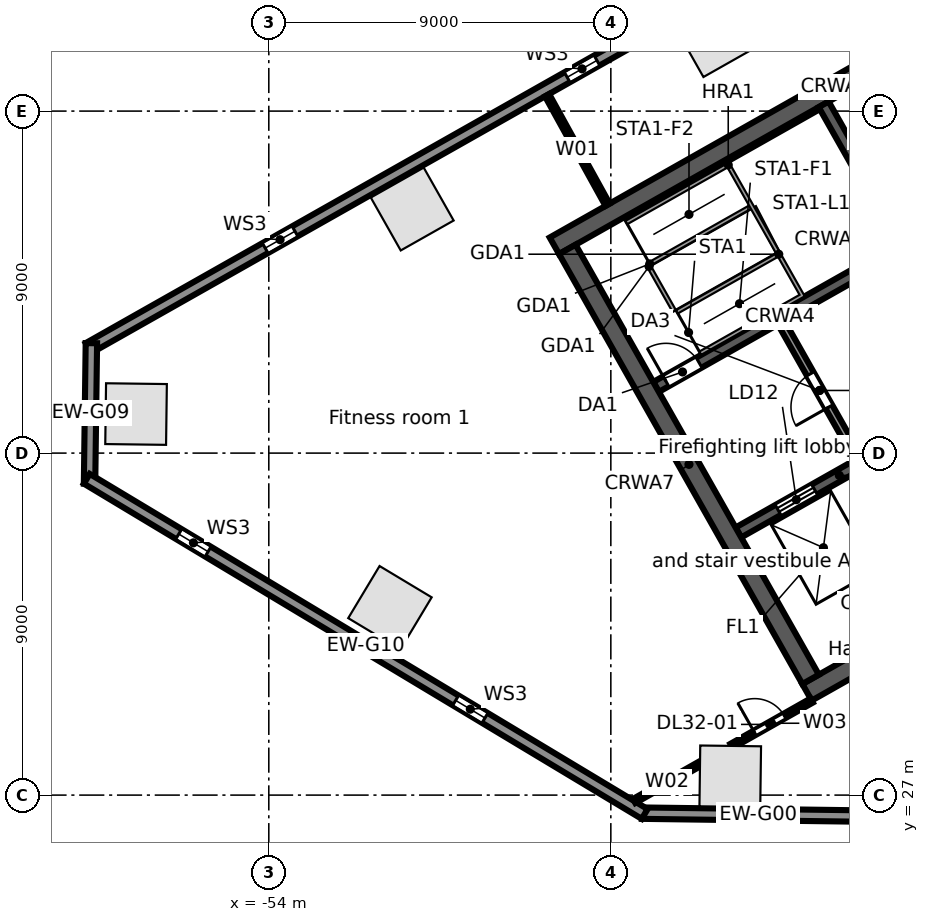
"""IFC4 building model, lengths in metres.
Left out: names, types, materials, properties, quantities, classifications, styles, units other than length and angle.
Written with IfcOpenShell. Run it as: python <this file> out.ifc"""

import sys

from ifc_helpers import new_model, si_unit, direction, frame, frame_2d, origin, origin_2d, place, context, subcontext, project, spatial, rectangle, extrude, element, fill, save


model = new_model("IFC4")
c1 = context("Model", 3, precision=1e-05, world=origin(), true_north=direction((0.0, 1.0)))
c2 = subcontext(c1, "Body", "Model", "MODEL_VIEW")
j1 = project(units=[si_unit("LENGTHUNIT", "METRE"), si_unit("PLANEANGLEUNIT", "RADIAN")], contexts=[c1])
p1 = place(None, origin())
s1 = spatial("IfcSite", under=j1, at=p1, CompositionType="ELEMENT")
p2 = place(p1, origin())
s2 = spatial("IfcBuilding", under=s1, at=p2, CompositionType="ELEMENT")
p3 = place(p2, frame((0.0, 0.0, 162.9)))
s3 = spatial("IfcBuildingStorey", under=s2, at=p3, CompositionType="ELEMENT", Elevation=162.9)
p4 = place(p3, frame((-42.28, 46.919, 0.0), z_axis=(0.0, 0.0, 1.0), x_axis=(-0.87035569594, -0.492423560103, 0.0)))
e1 = element("IfcColumn", 1, at=p4, inside=s3, PredefinedType="COLUMN", context=c2, shape_type="SweptSolid", body=[
    extrude(rectangle(XDim=1.5, YDim=1.5, at=origin_2d()), origin(), (0.0, 0.0, 1.0), 4.0),
])
for number, where, z_axis, x_axis in (
    (2, (-50.226, 42.423, 0.0), (0.0, 0.0, 1.0), (-0.87, -0.492, 0.0)),
    (3, (-57.493, 37.027, 0.0), (0.0, 0.0, 1.0), (-0.013, -1.0, 0.0)),
    (4, (-50.812, 31.931, 0.0), (0.0, 0.0, 1.0), (0.857, -0.515, 0.0)),
    (5, (-41.858, 27.495, 0.0), (0.0, 0.0, 1.0), (1.0, -0.013, 0.0)),
):
    element("IfcColumn", number, at=place(p3, frame(where, z_axis=z_axis, x_axis=x_axis)), inside=s3, PredefinedType="COLUMN", context=c2, shape_type="SweptSolid", body=[
        extrude(rectangle(XDim=1.6, YDim=1.6, at=origin_2d()), origin(), (0.0, 0.0, 1.0), 4.0),
    ])
p5 = place(p3, frame((-38.057, 26.445, 0.0), z_axis=(0.0, 0.0, 1.0), x_axis=(-0.999914086342, 0.013108010296, 0.0)))
e6 = element("IfcWall", 6, at=p5, inside=s3, PredefinedType="STANDARD", context=c2, shape_type="SweptSolid", body=[
    extrude(rectangle(XDim=6.128, YDim=0.3, at=frame_2d((3.064, 0.0))), origin(), (0.0, 0.0, 1.0), 3.68),
])
p6 = place(p3, frame((-58.745, 38.764, 0.0), z_axis=(0.0, 0.0, 1.0), x_axis=(0.870355811726, 0.492423355453, 0.0)))
e7 = element("IfcWall", 7, at=p6, inside=s3, PredefinedType="STANDARD", context=c2, shape_type="SweptSolid", body=[
    extrude(rectangle(XDim=64.025, YDim=0.3, at=frame_2d((32.013, 0.0))), origin(), (0.0, 0.0, 1.0), 3.68),
])
p7 = place(p6, frame((60.122, 0.0, 0.6)))
e8 = element("IfcOpeningElement", 8, at=p7, cuts=e7, PredefinedType="OPENING", context=c2, shape_type="SweptSolid", body=[
    extrude(rectangle(XDim=0.9, YDim=2.4, at=frame_2d((0.45, 1.2))), frame((0.0, 0.16, 0.0), z_axis=(0.0, -1.0, 0.0), x_axis=(1.0, 0.0, 0.0)), (0.0, 0.0, 1.0), 0.32),
])
p8 = place(p6, frame((50.992, 0.0, 0.6)))
e9 = element("IfcOpeningElement", 9, at=p8, cuts=e7, PredefinedType="OPENING", context=c2, shape_type="SweptSolid", body=[
    extrude(rectangle(XDim=0.9, YDim=2.4, at=frame_2d((0.45, 1.2))), frame((0.0, 0.16, 0.0), z_axis=(0.0, -1.0, 0.0), x_axis=(1.0, 0.0, 0.0)), (0.0, 0.0, 1.0), 0.32),
])
p9 = place(p6, frame((41.862, 0.0, 0.6)))
e10 = element("IfcOpeningElement", 10, at=p9, cuts=e7, PredefinedType="OPENING", context=c2, shape_type="SweptSolid", body=[
    extrude(rectangle(XDim=0.9, YDim=2.4, at=frame_2d((0.45, 1.2))), frame((0.0, 0.16, 0.0), z_axis=(0.0, -1.0, 0.0), x_axis=(1.0, 0.0, 0.0)), (0.0, 0.0, 1.0), 0.32),
])
p10 = place(p6, frame((32.732, 0.0, 0.6)))
e11 = element("IfcOpeningElement", 11, at=p10, cuts=e7, PredefinedType="OPENING", context=c2, shape_type="SweptSolid", body=[
    extrude(rectangle(XDim=0.9, YDim=2.4, at=frame_2d((0.45, 1.2))), frame((0.0, 0.16, 0.0), z_axis=(0.0, -1.0, 0.0), x_axis=(1.0, 0.0, 0.0)), (0.0, 0.0, 1.0), 0.32),
])
p11 = place(p6, frame((23.602, 0.0, 0.6)))
e12 = element("IfcOpeningElement", 12, at=p11, cuts=e7, PredefinedType="OPENING", context=c2, shape_type="SweptSolid", body=[
    extrude(rectangle(XDim=0.9, YDim=2.4, at=frame_2d((0.45, 1.2))), frame((0.0, 0.16, 0.0), z_axis=(0.0, -1.0, 0.0), x_axis=(1.0, 0.0, 0.0)), (0.0, 0.0, 1.0), 0.32),
])
p12 = place(p6, frame((14.472, 0.0, 0.6)))
e13 = element("IfcOpeningElement", 13, at=p12, cuts=e7, PredefinedType="OPENING", context=c2, shape_type="SweptSolid", body=[
    extrude(rectangle(XDim=0.9, YDim=2.4, at=frame_2d((0.45, 1.2))), frame((0.0, 0.16, 0.0), z_axis=(0.0, -1.0, 0.0), x_axis=(1.0, 0.0, 0.0)), (0.0, 0.0, 1.0), 0.32),
])
p13 = place(p6, frame((5.342, 0.0, 0.6)))
e14 = element("IfcOpeningElement", 14, at=p13, cuts=e7, PredefinedType="OPENING", context=c2, shape_type="SweptSolid", body=[
    extrude(rectangle(XDim=0.9, YDim=2.4, at=frame_2d((0.45, 1.2))), frame((0.0, 0.16, 0.0), z_axis=(0.0, -1.0, 0.0), x_axis=(1.0, 0.0, 0.0)), (0.0, 0.0, 1.0), 0.32),
])
p14 = place(p3, frame((-58.717, 35.194, 0.0), z_axis=(0.0, 0.0, 1.0), x_axis=(0.013069053407, 0.999914596275, 0.0)))
e15 = element("IfcWall", 15, at=p14, inside=s3, PredefinedType="STANDARD", context=c2, shape_type="SweptSolid", body=[
    extrude(rectangle(XDim=3.699, YDim=0.3, at=frame_2d((1.849, 0.0))), origin(), (0.0, 0.0, 1.0), 3.68),
])
p15 = place(p3, frame((-44.109, 26.504, 0.0), z_axis=(0.0, 0.0, 1.0), x_axis=(-0.857169502585, 0.515034410344, 0.0)))
e16 = element("IfcWall", 16, at=p15, inside=s3, PredefinedType="STANDARD", context=c2, shape_type="SweptSolid", body=[
    extrude(rectangle(XDim=17.127, YDim=0.3, at=frame_2d((8.563, 0.0))), origin(), (0.0, 0.0, 1.0), 3.68),
])
p16 = place(p15, frame((13.403, 0.0, 0.6)))
e17 = element("IfcOpeningElement", 17, at=p16, cuts=e16, PredefinedType="OPENING", context=c2, shape_type="SweptSolid", body=[
    extrude(rectangle(XDim=0.9, YDim=2.4, at=frame_2d((0.45, 1.2))), frame((0.0, 0.16, 0.0), z_axis=(0.0, -1.0, 0.0), x_axis=(1.0, 0.0, 0.0)), (0.0, 0.0, 1.0), 0.32),
])
p17 = place(p15, frame((4.903, 0.0, 0.6)))
e18 = element("IfcOpeningElement", 18, at=p17, cuts=e16, PredefinedType="OPENING", context=c2, shape_type="SweptSolid", body=[
    extrude(rectangle(XDim=0.9, YDim=2.4, at=frame_2d((0.45, 1.2))), frame((0.0, 0.16, 0.0), z_axis=(0.0, -1.0, 0.0), x_axis=(1.0, 0.0, 0.0)), (0.0, 0.0, 1.0), 0.32),
])
p18 = place(p3, frame((-39.838, 29.705, 0.0), z_axis=(0.0, 0.0, 1.0), x_axis=(0.870350116061, 0.492433422375, 0.0)))
e19 = element("IfcWall", 19, at=p18, inside=s3, PredefinedType="SOLIDWALL", context=c2, shape_type="SweptSolid", body=[
    extrude(rectangle(XDim=17.0, YDim=0.5, at=frame_2d((8.5, 0.0))), origin(), (0.0, 0.0, 1.0), 3.68),
])
p19 = place(p18, frame((7.2, 0.0, 0.0)))
e20 = element("IfcOpeningElement", 20, at=p19, cuts=e19, PredefinedType="OPENING", context=c2, shape_type="SweptSolid", body=[
    extrude(rectangle(XDim=1.2, YDim=2.1, at=frame_2d((0.6, 1.05))), frame((0.0, 0.26, 0.0), z_axis=(0.0, -1.0, 0.0), x_axis=(1.0, 0.0, 0.0)), (0.0, 0.0, 1.0), 0.52),
])
p20 = place(p3, frame((-41.643, 33.912, 0.0), z_axis=(0.0, 0.0, 1.0), x_axis=(0.870343599782, 0.492444939378, 0.0)))
e21 = element("IfcWall", 21, at=p20, inside=s3, PredefinedType="SOLIDWALL", context=c2, shape_type="SweptSolid", body=[
    extrude(rectangle(XDim=6.1, YDim=0.3, at=frame_2d((3.05, 0.0))), origin(), (0.0, 0.0, 1.0), 3.68),
])
p21 = place(p20, frame((1.2, 0.0, 0.0)))
e22 = element("IfcOpeningElement", 22, at=p21, cuts=e21, PredefinedType="OPENING", context=c2, shape_type="SweptSolid", body=[
    extrude(rectangle(XDim=1.1, YDim=2.1, at=frame_2d((0.55, 1.05))), frame((0.0, 0.16, 0.0), z_axis=(0.0, -1.0, 0.0), x_axis=(1.0, 0.0, 0.0)), (0.0, 0.0, 1.0), 0.32),
])
p22 = place(p20, frame((4.35, 0.0, 0.0)))
e23 = element("IfcOpeningElement", 23, at=p22, cuts=e21, PredefinedType="OPENING", context=c2, shape_type="SweptSolid", body=[
    extrude(rectangle(XDim=1.1, YDim=2.1, at=frame_2d((0.55, 1.05))), frame((0.0, 0.16, 0.0), z_axis=(0.0, -1.0, 0.0), x_axis=(1.0, 0.0, 0.0)), (0.0, 0.0, 1.0), 0.32),
])
p23 = place(p3, frame((-43.81, 37.741, 0.0), z_axis=(0.0, 0.0, 1.0), x_axis=(0.870350569555, 0.492432620848, 0.0)))
e24 = element("IfcWall", 24, at=p23, inside=s3, PredefinedType="SOLIDWALL", context=c2, shape_type="SweptSolid", body=[
    extrude(rectangle(XDim=7.5, YDim=0.3, at=frame_2d((3.75, 0.0))), origin(), (0.0, 0.0, 1.0), 3.68),
])
p24 = place(p23, frame((0.3, 0.0, 0.0)))
e25 = element("IfcOpeningElement", 25, at=p24, cuts=e24, PredefinedType="OPENING", context=c2, shape_type="SweptSolid", body=[
    extrude(rectangle(XDim=1.0, YDim=2.1, at=frame_2d((0.5, 1.05))), frame((0.0, 0.16, 0.0), z_axis=(0.0, -1.0, 0.0), x_axis=(1.0, 0.0, 0.0)), (0.0, 0.0, 1.0), 0.32),
])
p25 = place(p3, frame((-46.486, 41.455, 0.0), z_axis=(0.0, 0.0, 1.0), x_axis=(0.870353598469, 0.492427267353, 0.0)))
e26 = element("IfcWall", 26, at=p25, inside=s3, PredefinedType="SOLIDWALL", context=c2, shape_type="SweptSolid", body=[
    extrude(rectangle(XDim=17.0, YDim=0.5, at=frame_2d((8.5, 0.0))), origin(), (0.0, 0.0, 1.0), 3.68),
])
p26 = place(p3, frame((-46.145, 41.361, 0.0), z_axis=(0.0, 0.0, 1.0), x_axis=(0.492435316254, -0.870349044525, 0.0)))
e27 = element("IfcWall", 27, at=p26, inside=s3, PredefinedType="SOLIDWALL", context=c2, shape_type="SweptSolid", body=[
    extrude(rectangle(XDim=13.0, YDim=0.5, at=frame_2d((6.5, 0.0))), origin(), (0.0, 0.0, 1.0), 3.68),
])
p27 = place(p3, frame((-40.516, 39.433, 0.0), z_axis=(0.0, 0.0, 1.0), x_axis=(0.492453559952, -0.87033872216, 0.0)))
e28 = element("IfcWall", 28, at=p27, inside=s3, PredefinedType="PARTITIONING", context=c2, shape_type="SweptSolid", body=[
    extrude(rectangle(XDim=4.1, YDim=0.2, at=frame_2d((2.05, 0.0))), origin(), (0.0, 0.0, 1.0), 3.68),
])
p28 = place(p27, frame((1.55, 0.0, 0.0)))
e29 = element("IfcOpeningElement", 29, at=p28, cuts=e28, PredefinedType="OPENING", context=c2, shape_type="SweptSolid", body=[
    extrude(rectangle(XDim=1.0, YDim=2.1, at=frame_2d((0.5, 1.05))), frame((0.0, 0.11, 0.0), z_axis=(0.0, -1.0, 0.0), x_axis=(1.0, 0.0, 0.0)), (0.0, 0.0, 1.0), 0.22),
])
p29 = place(p3, frame((-39.399, 45.177, 0.0), z_axis=(0.0, 0.0, 1.0), x_axis=(0.492396453737, -0.870371031427, 0.0)))
e30 = element("IfcWall", 30, at=p29, inside=s3, PredefinedType="SOLIDWALL", context=c2, shape_type="SweptSolid", body=[
    extrude(rectangle(XDim=4.15, YDim=0.3, at=frame_2d((2.075, 0.0))), origin(), (0.0, 0.0, 1.0), 3.68),
])
p30 = place(p3, frame((-46.678, 45.419, 0.0), z_axis=(0.0, 0.0, 1.0), x_axis=(0.483275206546, -0.875468488718, 0.0)))
e31 = element("IfcWall", 31, at=p30, inside=s3, PredefinedType="PARTITIONING", context=c2, shape_type="SweptSolid", body=[
    extrude(rectangle(XDim=3.294, YDim=0.125, at=frame_2d((1.647, 0.0))), origin(), (0.0, 0.0, 1.0), 2.96),
])
p31 = place(p3, frame((-44.386, 26.845, 0.0), z_axis=(0.0, 0.0, 1.0), x_axis=(0.870453184796, 0.492251209322, 0.0)))
e32 = element("IfcWall", 32, at=p31, inside=s3, PredefinedType="PARTITIONING", context=c2, shape_type="SweptSolid", body=[
    extrude(rectangle(XDim=1.991, YDim=0.125, at=frame_2d((0.995, 0.0))), origin(), (0.0, 0.0, 1.0), 3.68),
])
p32 = place(p3, frame((-41.824, 28.294, 0.0), z_axis=(0.0, 0.0, 1.0), x_axis=(0.870189216305, 0.492717695873, 0.0)))
e33 = element("IfcWall", 33, at=p32, inside=s3, PredefinedType="PARTITIONING", context=c2, shape_type="SweptSolid", body=[
    extrude(rectangle(XDim=2.424, YDim=0.125, at=frame_2d((1.212, 0.0))), origin(), (0.0, 0.0, 1.0), 3.68),
])
p33 = place(p32, frame((0.7, 0.0, 0.0)))
e34 = element("IfcOpeningElement", 34, at=p33, cuts=e33, PredefinedType="OPENING", context=c2, shape_type="SweptSolid", body=[
    extrude(rectangle(XDim=0.9, YDim=2.1, at=frame_2d((0.45, 1.05))), frame((0.0, 0.073, 0.0), z_axis=(0.0, -1.0, 0.0), x_axis=(1.0, 0.0, 0.0)), (0.0, 0.0, 1.0), 0.145),
])
p34 = place(p12, origin())
e35 = element("IfcWindow", 35, at=p34, inside=s3, PartitioningType="SINGLE_PANEL", PredefinedType="WINDOW", context=c2, shape_type="SweptSolid", body=[
    extrude(rectangle(XDim=0.9, YDim=2.4, at=frame_2d((0.45, 1.2))), frame((0.0, 0.03, 0.0), z_axis=(0.0, -1.0, 0.0), x_axis=(1.0, 0.0, 0.0)), (0.0, 0.0, 1.0), 0.06),
])
fill(e13, e35)
p35 = place(p13, origin())
e36 = element("IfcWindow", 36, at=p35, inside=s3, PartitioningType="SINGLE_PANEL", PredefinedType="WINDOW", context=c2, shape_type="SweptSolid", body=[
    extrude(rectangle(XDim=0.9, YDim=2.4, at=frame_2d((0.45, 1.2))), frame((0.0, 0.03, 0.0), z_axis=(0.0, -1.0, 0.0), x_axis=(1.0, 0.0, 0.0)), (0.0, 0.0, 1.0), 0.06),
])
fill(e14, e36)
p36 = place(p16, origin())
e37 = element("IfcWindow", 37, at=p36, inside=s3, PartitioningType="SINGLE_PANEL", PredefinedType="WINDOW", context=c2, shape_type="SweptSolid", body=[
    extrude(rectangle(XDim=0.9, YDim=2.4, at=frame_2d((0.45, 1.2))), frame((0.0, 0.03, 0.0), z_axis=(0.0, -1.0, 0.0), x_axis=(1.0, 0.0, 0.0)), (0.0, 0.0, 1.0), 0.06),
])
fill(e17, e37)
p37 = place(p17, origin())
e38 = element("IfcWindow", 38, at=p37, inside=s3, PartitioningType="SINGLE_PANEL", PredefinedType="WINDOW", context=c2, shape_type="SweptSolid", body=[
    extrude(rectangle(XDim=0.9, YDim=2.4, at=frame_2d((0.45, 1.2))), frame((0.0, 0.03, 0.0), z_axis=(0.0, -1.0, 0.0), x_axis=(1.0, 0.0, 0.0)), (0.0, 0.0, 1.0), 0.06),
])
fill(e18, e38)
p38 = place(p21, origin())
e39 = element("IfcDoor", 39, at=p38, inside=s3, OperationType="DOUBLE_DOOR_SLIDING", PredefinedType="DOOR", context=c2, shape_type="SweptSolid", body=[
    extrude(rectangle(XDim=1.1, YDim=2.1, at=frame_2d((0.55, 1.05))), frame((0.0, 0.025, 0.0), z_axis=(0.0, -1.0, 0.0), x_axis=(1.0, 0.0, 0.0)), (0.0, 0.0, 1.0), 0.05),
])
fill(e22, e39)
p39 = place(p24, origin())
e40 = element("IfcDoor", 40, at=p39, inside=s3, OperationType="SINGLE_SWING_LEFT", PredefinedType="DOOR", context=c2, shape_type="SweptSolid", body=[
    extrude(rectangle(XDim=1.0, YDim=2.1, at=frame_2d((0.5, 1.05))), frame((0.0, 0.025, 0.0), z_axis=(0.0, -1.0, 0.0), x_axis=(1.0, 0.0, 0.0)), (0.0, 0.0, 1.0), 0.05),
])
fill(e25, e40)
p40 = place(p28, frame((1.0, 0.0, 0.0), z_axis=(0.0, 0.0, 1.0), x_axis=(-1.0, 0.0, 0.0)))
e41 = element("IfcDoor", 41, at=p40, inside=s3, OperationType="SINGLE_SWING_LEFT", PredefinedType="DOOR", context=c2, shape_type="SweptSolid", body=[
    extrude(rectangle(XDim=1.0, YDim=2.1, at=frame_2d((0.5, 1.05))), frame((0.0, 0.025, 0.0), z_axis=(0.0, -1.0, 0.0), x_axis=(1.0, 0.0, 0.0)), (0.0, 0.0, 1.0), 0.05),
])
fill(e29, e41)
p41 = place(p33, origin())
e42 = element("IfcDoor", 42, at=p41, inside=s3, OperationType="SINGLE_SWING_LEFT", PredefinedType="DOOR", context=c2, shape_type="SweptSolid", body=[
    extrude(rectangle(XDim=0.9, YDim=2.1, at=frame_2d((0.45, 1.05))), frame((0.0, 0.025, 0.0), z_axis=(0.0, -1.0, 0.0), x_axis=(1.0, 0.0, 0.0)), (0.0, 0.0, 1.0), 0.05),
])
fill(e34, e42)
save(model, sys.argv[1])
